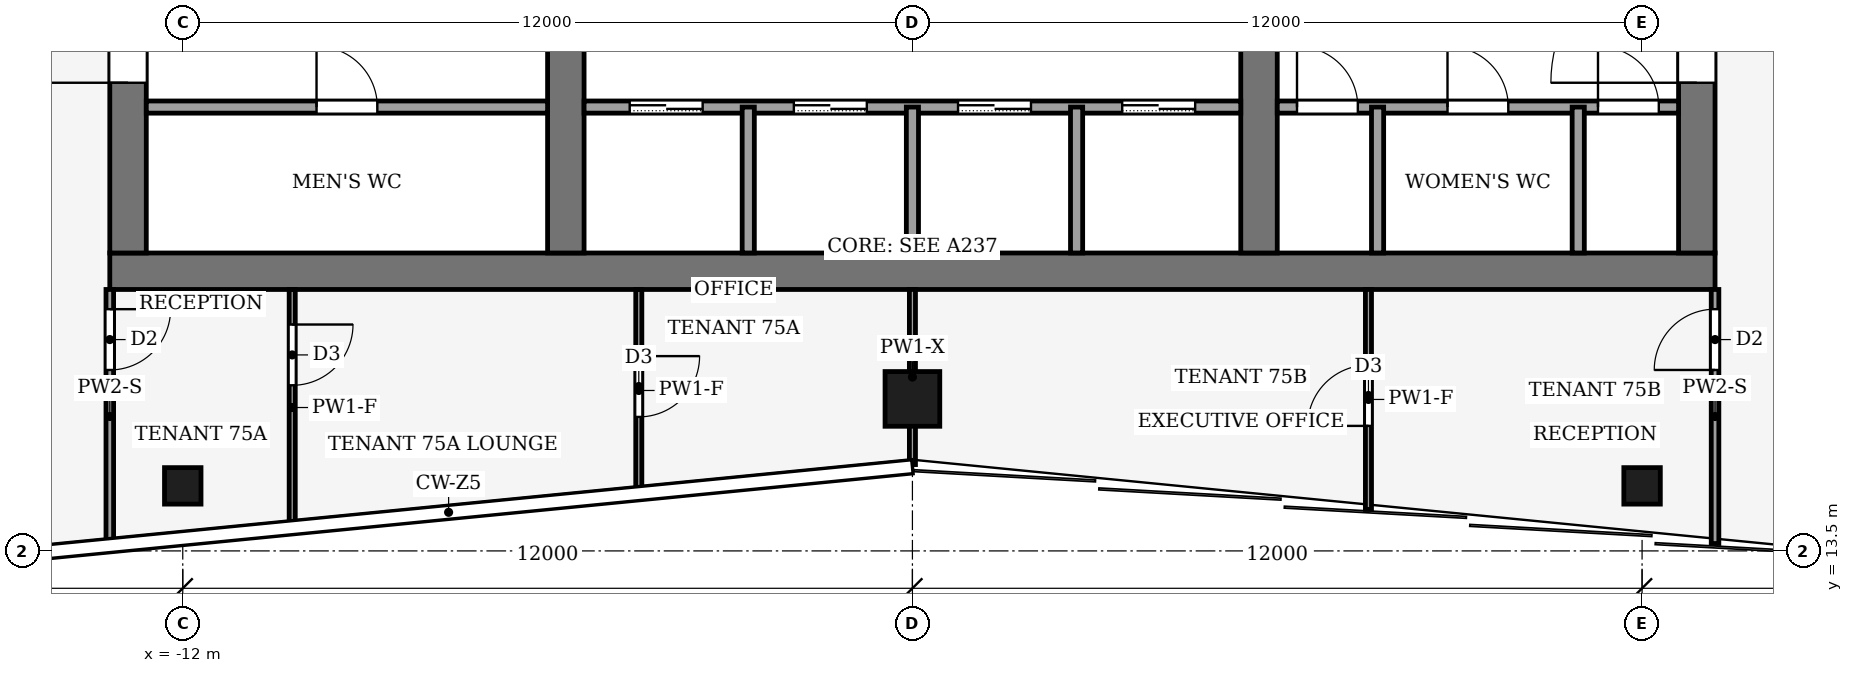
"""IFC4 building model, lengths in metres.
Left out: names, types, materials, properties, quantities, classifications, styles, units other than length and angle.
Written with IfcOpenShell. Run it as: python <this file> out.ifc"""

import sys

from ifc_helpers import new_model, si_unit, direction, frame, frame_2d, origin, origin_2d, place, context, subcontext, project, spatial, rectangle, hollow_rectangle, extrude, element, fill, save


model = new_model("IFC4")
c1 = context("Model", 3, precision=1e-05, world=origin(), true_north=direction((0.0, 1.0)))
c2 = subcontext(c1, "Body", "Model", "MODEL_VIEW")
j1 = project(units=[si_unit("LENGTHUNIT", "METRE"), si_unit("PLANEANGLEUNIT", "RADIAN")], contexts=[c1])
p1 = place(None, origin())
s1 = spatial("IfcSite", under=j1, at=p1, CompositionType="ELEMENT")
p2 = place(p1, origin())
s2 = spatial("IfcBuilding", under=s1, at=p2, CompositionType="ELEMENT")
p3 = place(p2, frame((0.0, 0.0, 326.0)))
s3 = spatial("IfcBuildingStorey", under=s2, at=p3, CompositionType="ELEMENT", Elevation=326.0)
p4 = place(p3, frame((-13.2, 18.1, -0.13), z_axis=(0.0, 0.0, 1.0), x_axis=(1.0, 0.0, 0.0)))
e1 = element("IfcWall", 1, at=p4, inside=s3, PredefinedType="SHEAR", context=c2, shape_type="SweptSolid", body=[
    extrude(rectangle(XDim=26.4, YDim=0.6, at=frame_2d((13.2, 0.0))), origin(), (0.0, 0.0, 1.0), 4.0),
])
p5 = place(p3, frame((-12.9, 18.4, -0.13), z_axis=(0.0, 0.0, 1.0), x_axis=(0.0, 1.0, 0.0)))
e2 = element("IfcWall", 2, at=p5, inside=s3, PredefinedType="SHEAR", context=c2, shape_type="SweptSolid", body=[
    extrude(rectangle(XDim=19.2, YDim=0.6, at=frame_2d((9.6, 0.0))), origin(), (0.0, 0.0, 1.0), 4.0),
])
p6 = place(p5, frame((2.8, 0.0, 0.13)))
e3 = element("IfcOpeningElement", 3, at=p6, cuts=e2, PredefinedType="OPENING", context=c2, shape_type="SweptSolid", body=[
    extrude(rectangle(XDim=2.4, YDim=2.4, at=frame_2d((1.2, 1.2))), frame((0.0, 0.31, 0.0), z_axis=(0.0, -1.0, 0.0), x_axis=(1.0, 0.0, 0.0)), (0.0, 0.0, 1.0), 0.62),
])
p7 = place(p5, frame((13.4, 0.0, 0.13)))
e4 = element("IfcOpeningElement", 4, at=p7, cuts=e2, PredefinedType="OPENING", context=c2, shape_type="SweptSolid", body=[
    extrude(rectangle(XDim=1.4, YDim=2.2, at=frame_2d((0.7, 1.1))), frame((0.0, 0.31, 0.0), z_axis=(0.0, -1.0, 0.0), x_axis=(1.0, 0.0, 0.0)), (0.0, 0.0, 1.0), 0.62),
])
p8 = place(p3, frame((12.9, 18.4, -0.13), z_axis=(0.0, 0.0, 1.0), x_axis=(0.0, 1.0, 0.0)))
e5 = element("IfcWall", 5, at=p8, inside=s3, PredefinedType="SHEAR", context=c2, shape_type="SweptSolid", body=[
    extrude(rectangle(XDim=19.2, YDim=0.6, at=frame_2d((9.6, 0.0))), origin(), (0.0, 0.0, 1.0), 4.0),
])
p9 = place(p8, frame((2.8, 0.0, 0.13)))
e6 = element("IfcOpeningElement", 6, at=p9, cuts=e5, PredefinedType="OPENING", context=c2, shape_type="SweptSolid", body=[
    extrude(rectangle(XDim=2.4, YDim=2.4, at=frame_2d((1.2, 1.2))), frame((0.0, 0.31, 0.0), z_axis=(0.0, -1.0, 0.0), x_axis=(1.0, 0.0, 0.0)), (0.0, 0.0, 1.0), 0.62),
])
p10 = place(p8, frame((13.3, 0.0, 0.13)))
e7 = element("IfcOpeningElement", 7, at=p10, cuts=e5, PredefinedType="OPENING", context=c2, shape_type="SweptSolid", body=[
    extrude(rectangle(XDim=2.4, YDim=2.4, at=frame_2d((1.2, 1.2))), frame((0.0, 0.31, 0.0), z_axis=(0.0, -1.0, 0.0), x_axis=(1.0, 0.0, 0.0)), (0.0, 0.0, 1.0), 0.62),
])
p11 = place(p3, frame((-5.7, 18.4, -0.13), z_axis=(0.0, 0.0, 1.0), x_axis=(0.0, 1.0, 0.0)))
e8 = element("IfcWall", 8, at=p11, inside=s3, PredefinedType="SHEAR", context=c2, shape_type="SweptSolid", body=[
    extrude(rectangle(XDim=19.2, YDim=0.6, at=frame_2d((9.6, 0.0))), origin(), (0.0, 0.0, 1.0), 4.0),
])
p12 = place(p11, frame((8.35, 0.0, 0.13)))
e9 = element("IfcOpeningElement", 9, at=p12, cuts=e8, PredefinedType="OPENING", context=c2, shape_type="SweptSolid", body=[
    extrude(rectangle(XDim=0.9, YDim=2.1, at=frame_2d((0.45, 1.05))), frame((0.0, 0.31, 0.0), z_axis=(0.0, -1.0, 0.0), x_axis=(1.0, 0.0, 0.0)), (0.0, 0.0, 1.0), 0.62),
])
p13 = place(p3, frame((5.7, 18.4, -0.13), z_axis=(0.0, 0.0, 1.0), x_axis=(0.0, 1.0, 0.0)))
e10 = element("IfcWall", 10, at=p13, inside=s3, PredefinedType="SHEAR", context=c2, shape_type="SweptSolid", body=[
    extrude(rectangle(XDim=19.2, YDim=0.6, at=frame_2d((9.6, 0.0))), origin(), (0.0, 0.0, 1.0), 4.0),
])
p14 = place(p13, frame((13.3, 0.0, 0.13)))
e11 = element("IfcOpeningElement", 11, at=p14, cuts=e10, PredefinedType="OPENING", context=c2, shape_type="SweptSolid", body=[
    extrude(rectangle(XDim=2.4, YDim=2.4, at=frame_2d((1.2, 1.2))), frame((0.0, 0.31, 0.0), z_axis=(0.0, -1.0, 0.0), x_axis=(1.0, 0.0, 0.0)), (0.0, 0.0, 1.0), 0.62),
])
p15 = place(p3, frame((0.0, 16.0, 0.0), z_axis=(0.0, 0.0, 1.0), x_axis=(1.0, 0.0, 0.0)))
e12 = element("IfcColumn", 12, at=p15, inside=s3, PredefinedType="COLUMN", context=c2, shape_type="SweptSolid", body=[
    extrude(hollow_rectangle(XDim=0.9, YDim=0.9, WallThickness=0.04, at=origin_2d()), origin(), (0.0, 0.0, 1.0), 4.0),
])
for number, where, z_axis, x_axis in (
    (13, (-12.0, 14.57, 0.0), (0.0, 0.0, 1.0), (1.0, 0.0, 0.0)),
    (14, (12.0, 14.57, 0.0), (0.0, 0.0, 1.0), (1.0, 0.0, 0.0)),
):
    element("IfcColumn", number, at=place(p3, frame(where, z_axis=z_axis, x_axis=x_axis)), inside=s3, PredefinedType="COLUMN", context=c2, shape_type="SweptSolid", body=[
        extrude(hollow_rectangle(XDim=0.6, YDim=0.6, WallThickness=0.025, at=origin_2d()), origin(), (0.0, 0.0, 1.0), 4.0),
    ])
p16 = place(p3, frame((-12.6, 20.8, 0.0), z_axis=(0.0, 0.0, 1.0), x_axis=(1.0, 0.0, 0.0)))
e15 = element("IfcWall", 15, at=p16, inside=s3, PredefinedType="PARTITIONING", context=c2, shape_type="SweptSolid", body=[
    extrude(rectangle(XDim=6.6, YDim=0.2, at=frame_2d((3.3, 0.0))), origin(), (0.0, 0.0, 1.0), 3.87),
])
p17 = place(p16, frame((2.8, 0.0, 0.0)))
e16 = element("IfcOpeningElement", 16, at=p17, cuts=e15, PredefinedType="OPENING", context=c2, shape_type="SweptSolid", body=[
    extrude(rectangle(XDim=1.0, YDim=2.1, at=frame_2d((0.5, 1.05))), frame((0.0, 0.11, 0.0), z_axis=(0.0, -1.0, 0.0), x_axis=(1.0, 0.0, 0.0)), (0.0, 0.0, 1.0), 0.22),
])
p18 = place(p3, frame((-5.4, 20.8, 0.0), z_axis=(0.0, 0.0, 1.0), x_axis=(1.0, 0.0, 0.0)))
e17 = element("IfcWall", 17, at=p18, inside=s3, PredefinedType="PARTITIONING", context=c2, shape_type="SweptSolid", body=[
    extrude(rectangle(XDim=10.8, YDim=0.2, at=frame_2d((5.4, 0.0))), origin(), (0.0, 0.0, 1.0), 3.87),
])
p19 = place(p18, frame((0.75, 0.0, 0.0)))
e18 = element("IfcOpeningElement", 18, at=p19, cuts=e17, PredefinedType="OPENING", context=c2, shape_type="SweptSolid", body=[
    extrude(rectangle(XDim=1.2, YDim=2.2, at=frame_2d((0.6, 1.1))), frame((0.0, 0.11, 0.0), z_axis=(0.0, -1.0, 0.0), x_axis=(1.0, 0.0, 0.0)), (0.0, 0.0, 1.0), 0.22),
])
p20 = place(p18, frame((3.45, 0.0, 0.0)))
e19 = element("IfcOpeningElement", 19, at=p20, cuts=e17, PredefinedType="OPENING", context=c2, shape_type="SweptSolid", body=[
    extrude(rectangle(XDim=1.2, YDim=2.2, at=frame_2d((0.6, 1.1))), frame((0.0, 0.11, 0.0), z_axis=(0.0, -1.0, 0.0), x_axis=(1.0, 0.0, 0.0)), (0.0, 0.0, 1.0), 0.22),
])
p21 = place(p18, frame((6.15, 0.0, 0.0)))
e20 = element("IfcOpeningElement", 20, at=p21, cuts=e17, PredefinedType="OPENING", context=c2, shape_type="SweptSolid", body=[
    extrude(rectangle(XDim=1.2, YDim=2.2, at=frame_2d((0.6, 1.1))), frame((0.0, 0.11, 0.0), z_axis=(0.0, -1.0, 0.0), x_axis=(1.0, 0.0, 0.0)), (0.0, 0.0, 1.0), 0.22),
])
p22 = place(p18, frame((8.85, 0.0, 0.0)))
e21 = element("IfcOpeningElement", 21, at=p22, cuts=e17, PredefinedType="OPENING", context=c2, shape_type="SweptSolid", body=[
    extrude(rectangle(XDim=1.2, YDim=2.2, at=frame_2d((0.6, 1.1))), frame((0.0, 0.11, 0.0), z_axis=(0.0, -1.0, 0.0), x_axis=(1.0, 0.0, 0.0)), (0.0, 0.0, 1.0), 0.22),
])
p23 = place(p3, frame((6.0, 20.8, 0.0), z_axis=(0.0, 0.0, 1.0), x_axis=(1.0, 0.0, 0.0)))
e22 = element("IfcWall", 22, at=p23, inside=s3, PredefinedType="PARTITIONING", context=c2, shape_type="SweptSolid", body=[
    extrude(rectangle(XDim=6.6, YDim=0.2, at=frame_2d((3.3, 0.0))), origin(), (0.0, 0.0, 1.0), 3.87),
])
p24 = place(p23, frame((0.325, 0.0, 0.0)))
e23 = element("IfcOpeningElement", 23, at=p24, cuts=e22, PredefinedType="OPENING", context=c2, shape_type="SweptSolid", body=[
    extrude(rectangle(XDim=1.0, YDim=2.1, at=frame_2d((0.5, 1.05))), frame((0.0, 0.11, 0.0), z_axis=(0.0, -1.0, 0.0), x_axis=(1.0, 0.0, 0.0)), (0.0, 0.0, 1.0), 0.22),
])
p25 = place(p23, frame((2.8, 0.0, 0.0)))
e24 = element("IfcOpeningElement", 24, at=p25, cuts=e22, PredefinedType="OPENING", context=c2, shape_type="SweptSolid", body=[
    extrude(rectangle(XDim=1.0, YDim=2.1, at=frame_2d((0.5, 1.05))), frame((0.0, 0.11, 0.0), z_axis=(0.0, -1.0, 0.0), x_axis=(1.0, 0.0, 0.0)), (0.0, 0.0, 1.0), 0.22),
])
p26 = place(p23, frame((5.275, 0.0, 0.0)))
e25 = element("IfcOpeningElement", 25, at=p26, cuts=e22, PredefinedType="OPENING", context=c2, shape_type="SweptSolid", body=[
    extrude(rectangle(XDim=1.0, YDim=2.1, at=frame_2d((0.5, 1.05))), frame((0.0, 0.11, 0.0), z_axis=(0.0, -1.0, 0.0), x_axis=(1.0, 0.0, 0.0)), (0.0, 0.0, 1.0), 0.22),
])
for number, where, z_axis, x_axis in (
    (26, (-2.7, 18.4, 0.0), (0.0, 0.0, 1.0), (0.0, 1.0, 0.0)),
    (27, (0.0, 18.4, 0.0), (0.0, 0.0, 1.0), (0.0, 1.0, 0.0)),
    (28, (2.7, 18.4, 0.0), (0.0, 0.0, 1.0), (0.0, 1.0, 0.0)),
    (29, (7.65, 18.4, 0.0), (0.0, 0.0, 1.0), (0.0, 1.0, 0.0)),
    (30, (10.95, 18.4, 0.0), (0.0, 0.0, 1.0), (0.0, 1.0, 0.0)),
):
    element("IfcWall", number, at=place(p3, frame(where, z_axis=z_axis, x_axis=x_axis)), inside=s3, PredefinedType="PARTITIONING", context=c2, shape_type="SweptSolid", body=[
        extrude(rectangle(XDim=2.4, YDim=0.2, at=frame_2d((1.2, 0.0))), origin(), (0.0, 0.0, 1.0), 3.87),
    ])
p27 = place(p3, frame((-13.2, 17.8, 0.0), z_axis=(0.0, 0.0, 1.0), x_axis=(0.0, -1.0, 0.0)))
e31 = element("IfcWall", 31, at=p27, inside=s3, PredefinedType="PARTITIONING", context=c2, shape_type="SweptSolid", body=[
    extrude(rectangle(XDim=4.178, YDim=0.125, at=frame_2d((2.089, 0.0))), origin(), (0.0, 0.0, 1.0), 3.04),
])
p28 = place(p27, frame((0.324, 0.0, 0.0)))
e32 = element("IfcOpeningElement", 32, at=p28, cuts=e31, PredefinedType="OPENING", context=c2, shape_type="SweptSolid", body=[
    extrude(rectangle(XDim=1.0, YDim=2.1, at=frame_2d((0.5, 1.05))), frame((0.0, 0.073, 0.0), z_axis=(0.0, -1.0, 0.0), x_axis=(1.0, 0.0, 0.0)), (0.0, 0.0, 1.0), 0.145),
])
p29 = place(p3, frame((13.2, 13.622, 0.0), z_axis=(0.0, 0.0, 1.0), x_axis=(0.0, 1.0, 0.0)))
e33 = element("IfcWall", 33, at=p29, inside=s3, PredefinedType="PARTITIONING", context=c2, shape_type="SweptSolid", body=[
    extrude(rectangle(XDim=4.178, YDim=0.125, at=frame_2d((2.089, 0.0))), origin(), (0.0, 0.0, 1.0), 3.04),
])
p30 = place(p29, frame((2.854, 0.0, 0.0)))
e34 = element("IfcOpeningElement", 34, at=p30, cuts=e33, PredefinedType="OPENING", context=c2, shape_type="SweptSolid", body=[
    extrude(rectangle(XDim=1.0, YDim=2.1, at=frame_2d((0.5, 1.05))), frame((0.0, 0.073, 0.0), z_axis=(0.0, -1.0, 0.0), x_axis=(1.0, 0.0, 0.0)), (0.0, 0.0, 1.0), 0.145),
])
p31 = place(p3, frame((-10.2, 17.8, 0.0), z_axis=(0.0, 0.0, 1.0), x_axis=(0.0, -1.0, 0.0)))
e35 = element("IfcWall", 35, at=p31, inside=s3, PredefinedType="PARTITIONING", context=c2, shape_type="SweptSolid", body=[
    extrude(rectangle(XDim=3.883, YDim=0.1, at=frame_2d((1.942, 0.0))), origin(), (0.0, 0.0, 1.0), 3.04),
])
p32 = place(p31, frame((0.576, 0.0, 0.0)))
e36 = element("IfcOpeningElement", 36, at=p32, cuts=e35, PredefinedType="OPENING", context=c2, shape_type="SweptSolid", body=[
    extrude(rectangle(XDim=1.0, YDim=2.1, at=frame_2d((0.5, 1.05))), frame((0.0, 0.06, 0.0), z_axis=(0.0, -1.0, 0.0), x_axis=(1.0, 0.0, 0.0)), (0.0, 0.0, 1.0), 0.12),
])
p33 = place(p3, frame((-4.5, 17.8, 0.0), z_axis=(0.0, 0.0, 1.0), x_axis=(0.0, -1.0, 0.0)))
e37 = element("IfcWall", 37, at=p33, inside=s3, PredefinedType="PARTITIONING", context=c2, shape_type="SweptSolid", body=[
    extrude(rectangle(XDim=3.323, YDim=0.1, at=frame_2d((1.661, 0.0))), origin(), (0.0, 0.0, 1.0), 3.04),
])
p34 = place(p33, frame((1.096, 0.0, 0.0)))
e38 = element("IfcOpeningElement", 38, at=p34, cuts=e37, PredefinedType="OPENING", context=c2, shape_type="SweptSolid", body=[
    extrude(rectangle(XDim=1.0, YDim=2.1, at=frame_2d((0.5, 1.05))), frame((0.0, 0.06, 0.0), z_axis=(0.0, -1.0, 0.0), x_axis=(1.0, 0.0, 0.0)), (0.0, 0.0, 1.0), 0.12),
])
p35 = place(p3, frame((0.0, 14.92, 0.0), z_axis=(0.0, 0.0, 1.0), x_axis=(0.0, 1.0, 0.0)))
e39 = element("IfcWall", 39, at=p35, inside=s3, PredefinedType="PARTITIONING", context=c2, shape_type="SweptSolid", body=[
    extrude(rectangle(XDim=2.88, YDim=0.1, at=frame_2d((1.44, 0.0))), origin(), (0.0, 0.0, 1.0), 3.54),
])
p36 = place(p3, frame((7.5, 14.182, 0.0), z_axis=(0.0, 0.0, 1.0), x_axis=(0.0, 1.0, 0.0)))
e40 = element("IfcWall", 40, at=p36, inside=s3, PredefinedType="PARTITIONING", context=c2, shape_type="SweptSolid", body=[
    extrude(rectangle(XDim=3.618, YDim=0.1, at=frame_2d((1.809, 0.0))), origin(), (0.0, 0.0, 1.0), 3.04),
])
p37 = place(p36, frame((1.374, 0.0, 0.0)))
e41 = element("IfcOpeningElement", 41, at=p37, cuts=e40, PredefinedType="OPENING", context=c2, shape_type="SweptSolid", body=[
    extrude(rectangle(XDim=1.0, YDim=2.1, at=frame_2d((0.5, 1.05))), frame((0.0, 0.06, 0.0), z_axis=(0.0, -1.0, 0.0), x_axis=(1.0, 0.0, 0.0)), (0.0, 0.0, 1.0), 0.12),
])
p38 = place(p19, origin())
e42 = element("IfcDoor", 42, at=p38, inside=s3, OperationType="SLIDING_TO_LEFT", PredefinedType="DOOR", context=c2, shape_type="SweptSolid", body=[
    extrude(rectangle(XDim=1.2, YDim=2.2, at=frame_2d((0.6, 1.1))), frame((0.0, 0.025, 0.0), z_axis=(0.0, -1.0, 0.0), x_axis=(1.0, 0.0, 0.0)), (0.0, 0.0, 1.0), 0.05),
])
fill(e18, e42)
p39 = place(p20, origin())
e43 = element("IfcDoor", 43, at=p39, inside=s3, OperationType="SLIDING_TO_LEFT", PredefinedType="DOOR", context=c2, shape_type="SweptSolid", body=[
    extrude(rectangle(XDim=1.2, YDim=2.2, at=frame_2d((0.6, 1.1))), frame((0.0, 0.025, 0.0), z_axis=(0.0, -1.0, 0.0), x_axis=(1.0, 0.0, 0.0)), (0.0, 0.0, 1.0), 0.05),
])
fill(e19, e43)
p40 = place(p21, origin())
e44 = element("IfcDoor", 44, at=p40, inside=s3, OperationType="SLIDING_TO_LEFT", PredefinedType="DOOR", context=c2, shape_type="SweptSolid", body=[
    extrude(rectangle(XDim=1.2, YDim=2.2, at=frame_2d((0.6, 1.1))), frame((0.0, 0.025, 0.0), z_axis=(0.0, -1.0, 0.0), x_axis=(1.0, 0.0, 0.0)), (0.0, 0.0, 1.0), 0.05),
])
fill(e20, e44)
p41 = place(p22, origin())
e45 = element("IfcDoor", 45, at=p41, inside=s3, OperationType="SLIDING_TO_LEFT", PredefinedType="DOOR", context=c2, shape_type="SweptSolid", body=[
    extrude(rectangle(XDim=1.2, YDim=2.2, at=frame_2d((0.6, 1.1))), frame((0.0, 0.025, 0.0), z_axis=(0.0, -1.0, 0.0), x_axis=(1.0, 0.0, 0.0)), (0.0, 0.0, 1.0), 0.05),
])
fill(e21, e45)
p42 = place(p17, origin())
e46 = element("IfcDoor", 46, at=p42, inside=s3, OperationType="SINGLE_SWING_LEFT", PredefinedType="DOOR", context=c2, shape_type="SweptSolid", body=[
    extrude(rectangle(XDim=1.0, YDim=2.1, at=frame_2d((0.5, 1.05))), frame((0.0, 0.025, 0.0), z_axis=(0.0, -1.0, 0.0), x_axis=(1.0, 0.0, 0.0)), (0.0, 0.0, 1.0), 0.05),
])
fill(e16, e46)
p43 = place(p24, origin())
e47 = element("IfcDoor", 47, at=p43, inside=s3, OperationType="SINGLE_SWING_LEFT", PredefinedType="DOOR", context=c2, shape_type="SweptSolid", body=[
    extrude(rectangle(XDim=1.0, YDim=2.1, at=frame_2d((0.5, 1.05))), frame((0.0, 0.025, 0.0), z_axis=(0.0, -1.0, 0.0), x_axis=(1.0, 0.0, 0.0)), (0.0, 0.0, 1.0), 0.05),
])
fill(e23, e47)
p44 = place(p25, origin())
e48 = element("IfcDoor", 48, at=p44, inside=s3, OperationType="SINGLE_SWING_LEFT", PredefinedType="DOOR", context=c2, shape_type="SweptSolid", body=[
    extrude(rectangle(XDim=1.0, YDim=2.1, at=frame_2d((0.5, 1.05))), frame((0.0, 0.025, 0.0), z_axis=(0.0, -1.0, 0.0), x_axis=(1.0, 0.0, 0.0)), (0.0, 0.0, 1.0), 0.05),
])
fill(e24, e48)
p45 = place(p26, origin())
e49 = element("IfcDoor", 49, at=p45, inside=s3, OperationType="SINGLE_SWING_LEFT", PredefinedType="DOOR", context=c2, shape_type="SweptSolid", body=[
    extrude(rectangle(XDim=1.0, YDim=2.1, at=frame_2d((0.5, 1.05))), frame((0.0, 0.025, 0.0), z_axis=(0.0, -1.0, 0.0), x_axis=(1.0, 0.0, 0.0)), (0.0, 0.0, 1.0), 0.05),
])
fill(e25, e49)
p46 = place(p6, origin())
e50 = element("IfcDoor", 50, at=p46, inside=s3, OperationType="DOUBLE_DOOR_SINGLE_SWING", PredefinedType="DOOR", context=c2, shape_type="SweptSolid", body=[
    extrude(rectangle(XDim=2.4, YDim=2.4, at=frame_2d((1.2, 1.2))), frame((0.0, 0.025, 0.0), z_axis=(0.0, -1.0, 0.0), x_axis=(1.0, 0.0, 0.0)), (0.0, 0.0, 1.0), 0.05),
])
fill(e3, e50)
p47 = place(p9, origin())
e51 = element("IfcDoor", 51, at=p47, inside=s3, OperationType="DOUBLE_DOOR_SINGLE_SWING", PredefinedType="DOOR", context=c2, shape_type="SweptSolid", body=[
    extrude(rectangle(XDim=2.4, YDim=2.4, at=frame_2d((1.2, 1.2))), frame((0.0, 0.025, 0.0), z_axis=(0.0, -1.0, 0.0), x_axis=(1.0, 0.0, 0.0)), (0.0, 0.0, 1.0), 0.05),
])
fill(e6, e51)
p48 = place(p28, origin())
e52 = element("IfcDoor", 52, at=p48, inside=s3, OperationType="SINGLE_SWING_LEFT", PredefinedType="DOOR", context=c2, shape_type="SweptSolid", body=[
    extrude(rectangle(XDim=1.0, YDim=2.1, at=frame_2d((0.5, 1.05))), frame((0.0, 0.025, 0.0), z_axis=(0.0, -1.0, 0.0), x_axis=(1.0, 0.0, 0.0)), (0.0, 0.0, 1.0), 0.05),
])
fill(e32, e52)
p49 = place(p30, origin())
e53 = element("IfcDoor", 53, at=p49, inside=s3, OperationType="SINGLE_SWING_RIGHT", PredefinedType="DOOR", context=c2, shape_type="SweptSolid", body=[
    extrude(rectangle(XDim=1.0, YDim=2.1, at=frame_2d((0.5, 1.05))), frame((0.0, 0.025, 0.0), z_axis=(0.0, -1.0, 0.0), x_axis=(1.0, 0.0, 0.0)), (0.0, 0.0, 1.0), 0.05),
])
fill(e34, e53)
p50 = place(p32, origin())
e54 = element("IfcDoor", 54, at=p50, inside=s3, OperationType="SINGLE_SWING_LEFT", PredefinedType="DOOR", context=c2, shape_type="SweptSolid", body=[
    extrude(rectangle(XDim=1.0, YDim=2.1, at=frame_2d((0.5, 1.05))), frame((0.0, 0.025, 0.0), z_axis=(0.0, -1.0, 0.0), x_axis=(1.0, 0.0, 0.0)), (0.0, 0.0, 1.0), 0.05),
])
fill(e36, e54)
p51 = place(p34, origin())
e55 = element("IfcDoor", 55, at=p51, inside=s3, OperationType="SINGLE_SWING_LEFT", PredefinedType="DOOR", context=c2, shape_type="SweptSolid", body=[
    extrude(rectangle(XDim=1.0, YDim=2.1, at=frame_2d((0.5, 1.05))), frame((0.0, 0.025, 0.0), z_axis=(0.0, -1.0, 0.0), x_axis=(1.0, 0.0, 0.0)), (0.0, 0.0, 1.0), 0.05),
])
fill(e38, e55)
p52 = place(p37, origin())
e56 = element("IfcDoor", 56, at=p52, inside=s3, OperationType="SINGLE_SWING_RIGHT", PredefinedType="DOOR", context=c2, shape_type="SweptSolid", body=[
    extrude(rectangle(XDim=1.0, YDim=2.1, at=frame_2d((0.5, 1.05))), frame((0.0, 0.025, 0.0), z_axis=(0.0, -1.0, 0.0), x_axis=(1.0, 0.0, 0.0)), (0.0, 0.0, 1.0), 0.05),
])
fill(e41, e56)
save(model, sys.argv[1])
